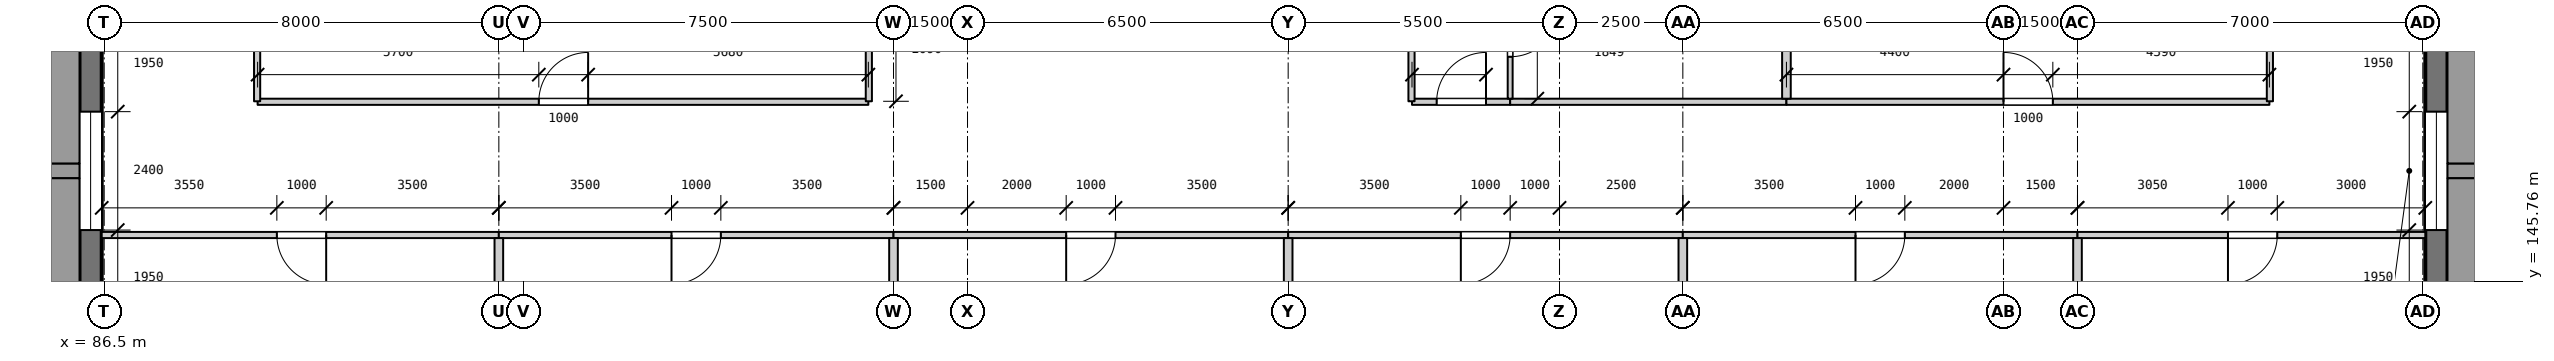
"""IFC4 building model, lengths in metres.
Left out: names, types, materials, properties, quantities, classifications, styles, units other than length and angle.
Written with IfcOpenShell. Run it as: python <this file> out.ifc"""

import sys

from ifc_helpers import new_model, si_unit, direction, frame, frame_2d, origin, place, context, subcontext, project, spatial, rectangle, extrude, element, fill, save


model = new_model("IFC4")
c1 = context("Model", 3, precision=1e-05, world=origin(), true_north=direction((0.0, 1.0)))
c2 = subcontext(c1, "Body", "Model", "MODEL_VIEW")
j1 = project(units=[si_unit("LENGTHUNIT", "METRE"), si_unit("PLANEANGLEUNIT", "RADIAN")], contexts=[c1])
p1 = place(None, origin())
s1 = spatial("IfcSite", under=j1, at=p1, CompositionType="ELEMENT")
p2 = place(p1, origin())
s2 = spatial("IfcBuilding", under=s1, at=p2, CompositionType="ELEMENT")
p3 = place(p2, frame((0.0, 0.0, 6.0)))
s3 = spatial("IfcBuildingStorey", under=s2, at=p3, CompositionType="ELEMENT", Elevation=6.0)
p4 = place(p3, frame((86.225, 144.85, 0.0), z_axis=(0.0, 0.0, 1.0), x_axis=(0.0, 1.0, 0.0)))
e1 = element("IfcWall", 1, at=p4, inside=s3, PredefinedType="SOLIDWALL", context=c2, shape_type="SweptSolid", body=[
    extrude(rectangle(XDim=6.3, YDim=0.45, at=frame_2d((3.15, 0.0))), origin(), (0.0, 0.0, 1.0), 3.2),
])
p5 = place(p4, frame((1.95, 0.0, 0.9)))
e2 = element("IfcOpeningElement", 2, at=p5, cuts=e1, PredefinedType="OPENING", context=c2, shape_type="SweptSolid", body=[
    extrude(rectangle(XDim=2.4, YDim=1.6, at=frame_2d((1.2, 0.8))), frame((0.0, 0.235, 0.0), z_axis=(0.0, -1.0, 0.0), x_axis=(1.0, 0.0, 0.0)), (0.0, 0.0, 1.0), 0.47),
])
p6 = place(p3, frame((133.775, 151.15, 0.0), z_axis=(0.0, 0.0, 1.0), x_axis=(0.0, -1.0, 0.0)))
e3 = element("IfcWall", 3, at=p6, inside=s3, PredefinedType="SOLIDWALL", context=c2, shape_type="SweptSolid", body=[
    extrude(rectangle(XDim=6.3, YDim=0.45, at=frame_2d((3.15, 0.0))), origin(), (0.0, 0.0, 1.0), 3.2),
])
p7 = place(p6, frame((1.95, 0.0, 0.9)))
e4 = element("IfcOpeningElement", 4, at=p7, cuts=e3, PredefinedType="OPENING", context=c2, shape_type="SweptSolid", body=[
    extrude(rectangle(XDim=2.4, YDim=1.6, at=frame_2d((1.2, 0.8))), frame((0.0, 0.235, 0.0), z_axis=(0.0, -1.0, 0.0), x_axis=(1.0, 0.0, 0.0)), (0.0, 0.0, 1.0), 0.47),
])
p8 = place(p3, frame((86.45, 146.7, 0.0), z_axis=(0.0, 0.0, 1.0), x_axis=(1.0, 0.0, 0.0)))
e5 = element("IfcWall", 5, at=p8, inside=s3, PredefinedType="PARTITIONING", context=c2, shape_type="SweptSolid", body=[
    extrude(rectangle(XDim=8.05, YDim=0.125, at=frame_2d((4.025, 0.0))), origin(), (0.0, 0.0, 1.0), 3.9),
])
p9 = place(p8, frame((3.55, 0.0, 0.0)))
e6 = element("IfcOpeningElement", 6, at=p9, cuts=e5, PredefinedType="OPENING", context=c2, shape_type="SweptSolid", body=[
    extrude(rectangle(XDim=1.0, YDim=2.1, at=frame_2d((0.5, 1.05))), frame((0.0, 0.073, 0.0), z_axis=(0.0, -1.0, 0.0), x_axis=(1.0, 0.0, 0.0)), (0.0, 0.0, 1.0), 0.145),
])
p10 = place(p3, frame((94.5, 146.7, 0.0), z_axis=(0.0, 0.0, 1.0), x_axis=(1.0, 0.0, 0.0)))
e7 = element("IfcWall", 7, at=p10, inside=s3, PredefinedType="PARTITIONING", context=c2, shape_type="SweptSolid", body=[
    extrude(rectangle(XDim=8.0, YDim=0.125, at=frame_2d((4.0, 0.0))), origin(), (0.0, 0.0, 1.0), 3.9),
])
p11 = place(p10, frame((3.5, 0.0, 0.0)))
e8 = element("IfcOpeningElement", 8, at=p11, cuts=e7, PredefinedType="OPENING", context=c2, shape_type="SweptSolid", body=[
    extrude(rectangle(XDim=1.0, YDim=2.1, at=frame_2d((0.5, 1.05))), frame((0.0, 0.073, 0.0), z_axis=(0.0, -1.0, 0.0), x_axis=(1.0, 0.0, 0.0)), (0.0, 0.0, 1.0), 0.145),
])
p12 = place(p3, frame((102.5, 146.7, 0.0), z_axis=(0.0, 0.0, 1.0), x_axis=(1.0, 0.0, 0.0)))
e9 = element("IfcWall", 9, at=p12, inside=s3, PredefinedType="PARTITIONING", context=c2, shape_type="SweptSolid", body=[
    extrude(rectangle(XDim=8.0, YDim=0.125, at=frame_2d((4.0, 0.0))), origin(), (0.0, 0.0, 1.0), 3.9),
])
p13 = place(p12, frame((3.5, 0.0, 0.0)))
e10 = element("IfcOpeningElement", 10, at=p13, cuts=e9, PredefinedType="OPENING", context=c2, shape_type="SweptSolid", body=[
    extrude(rectangle(XDim=1.0, YDim=2.1, at=frame_2d((0.5, 1.05))), frame((0.0, 0.073, 0.0), z_axis=(0.0, -1.0, 0.0), x_axis=(1.0, 0.0, 0.0)), (0.0, 0.0, 1.0), 0.145),
])
p14 = place(p3, frame((110.5, 146.7, 0.0), z_axis=(0.0, 0.0, 1.0), x_axis=(1.0, 0.0, 0.0)))
e11 = element("IfcWall", 11, at=p14, inside=s3, PredefinedType="PARTITIONING", context=c2, shape_type="SweptSolid", body=[
    extrude(rectangle(XDim=8.0, YDim=0.125, at=frame_2d((4.0, 0.0))), origin(), (0.0, 0.0, 1.0), 3.9),
])
p15 = place(p14, frame((3.5, 0.0, 0.0)))
e12 = element("IfcOpeningElement", 12, at=p15, cuts=e11, PredefinedType="OPENING", context=c2, shape_type="SweptSolid", body=[
    extrude(rectangle(XDim=1.0, YDim=2.1, at=frame_2d((0.5, 1.05))), frame((0.0, 0.073, 0.0), z_axis=(0.0, -1.0, 0.0), x_axis=(1.0, 0.0, 0.0)), (0.0, 0.0, 1.0), 0.145),
])
p16 = place(p3, frame((118.5, 146.7, 0.0), z_axis=(0.0, 0.0, 1.0), x_axis=(1.0, 0.0, 0.0)))
e13 = element("IfcWall", 13, at=p16, inside=s3, PredefinedType="PARTITIONING", context=c2, shape_type="SweptSolid", body=[
    extrude(rectangle(XDim=8.0, YDim=0.125, at=frame_2d((4.0, 0.0))), origin(), (0.0, 0.0, 1.0), 3.9),
])
p17 = place(p16, frame((3.5, 0.0, 0.0)))
e14 = element("IfcOpeningElement", 14, at=p17, cuts=e13, PredefinedType="OPENING", context=c2, shape_type="SweptSolid", body=[
    extrude(rectangle(XDim=1.0, YDim=2.1, at=frame_2d((0.5, 1.05))), frame((0.0, 0.073, 0.0), z_axis=(0.0, -1.0, 0.0), x_axis=(1.0, 0.0, 0.0)), (0.0, 0.0, 1.0), 0.145),
])
p18 = place(p3, frame((126.5, 146.7, 0.0), z_axis=(0.0, 0.0, 1.0), x_axis=(1.0, 0.0, 0.0)))
e15 = element("IfcWall", 15, at=p18, inside=s3, PredefinedType="PARTITIONING", context=c2, shape_type="SweptSolid", body=[
    extrude(rectangle(XDim=7.05, YDim=0.125, at=frame_2d((3.525, 0.0))), origin(), (0.0, 0.0, 1.0), 3.9),
])
p19 = place(p18, frame((3.05, 0.0, 0.0)))
e16 = element("IfcOpeningElement", 16, at=p19, cuts=e15, PredefinedType="OPENING", context=c2, shape_type="SweptSolid", body=[
    extrude(rectangle(XDim=1.0, YDim=2.1, at=frame_2d((0.5, 1.05))), frame((0.0, 0.073, 0.0), z_axis=(0.0, -1.0, 0.0), x_axis=(1.0, 0.0, 0.0)), (0.0, 0.0, 1.0), 0.145),
])
p20 = place(p3, frame((89.61, 149.4, 0.0), z_axis=(0.0, 0.0, 1.0), x_axis=(1.0, 0.0, 0.0)))
e17 = element("IfcWall", 17, at=p20, inside=s3, PredefinedType="PARTITIONING", context=c2, shape_type="SweptSolid", body=[
    extrude(rectangle(XDim=12.38, YDim=0.125, at=frame_2d((6.19, 0.0))), origin(), (0.0, 0.0, 1.0), 3.9),
])
p21 = place(p20, frame((5.7, 0.0, 0.0)))
e18 = element("IfcOpeningElement", 18, at=p21, cuts=e17, PredefinedType="OPENING", context=c2, shape_type="SweptSolid", body=[
    extrude(rectangle(XDim=1.0, YDim=2.1, at=frame_2d((0.5, 1.05))), frame((0.0, 0.073, 0.0), z_axis=(0.0, -1.0, 0.0), x_axis=(1.0, 0.0, 0.0)), (0.0, 0.0, 1.0), 0.145),
])
p22 = place(p3, frame((113.01, 149.4, 0.0), z_axis=(0.0, 0.0, 1.0), x_axis=(1.0, 0.0, 0.0)))
e19 = element("IfcWall", 19, at=p22, inside=s3, PredefinedType="PARTITIONING", context=c2, shape_type="SweptSolid", body=[
    extrude(rectangle(XDim=1.99, YDim=0.125, at=frame_2d((0.995, 0.0))), origin(), (0.0, 0.0, 1.0), 3.9),
])
p23 = place(p22, frame((0.5, 0.0, 0.0)))
e20 = element("IfcOpeningElement", 20, at=p23, cuts=e19, PredefinedType="OPENING", context=c2, shape_type="SweptSolid", body=[
    extrude(rectangle(XDim=1.0, YDim=2.1, at=frame_2d((0.5, 1.05))), frame((0.0, 0.073, 0.0), z_axis=(0.0, -1.0, 0.0), x_axis=(1.0, 0.0, 0.0)), (0.0, 0.0, 1.0), 0.145),
])
p24 = place(p3, frame((115.0, 149.4, 0.0), z_axis=(0.0, 0.0, 1.0), x_axis=(1.0, 0.0, 0.0)))
e21 = element("IfcWall", 21, at=p24, inside=s3, PredefinedType="PARTITIONING", context=c2, shape_type="SweptSolid", body=[
    extrude(rectangle(XDim=5.6, YDim=0.125, at=frame_2d((2.8, 0.0))), origin(), (0.0, 0.0, 1.0), 3.9),
])
p25 = place(p3, frame((120.6, 149.4, 0.0), z_axis=(0.0, 0.0, 1.0), x_axis=(1.0, 0.0, 0.0)))
e22 = element("IfcWall", 22, at=p25, inside=s3, PredefinedType="PARTITIONING", context=c2, shape_type="SweptSolid", body=[
    extrude(rectangle(XDim=9.79, YDim=0.125, at=frame_2d((4.895, 0.0))), origin(), (0.0, 0.0, 1.0), 3.9),
])
p26 = place(p25, frame((4.4, 0.0, 0.0)))
e23 = element("IfcOpeningElement", 23, at=p26, cuts=e22, PredefinedType="OPENING", context=c2, shape_type="SweptSolid", body=[
    extrude(rectangle(XDim=1.0, YDim=2.1, at=frame_2d((0.5, 1.05))), frame((0.0, 0.073, 0.0), z_axis=(0.0, -1.0, 0.0), x_axis=(1.0, 0.0, 0.0)), (0.0, 0.0, 1.0), 0.145),
])
p27 = place(p3, frame((89.6, 149.41, 0.0), z_axis=(0.0, 0.0, 1.0), x_axis=(0.0, 1.0, 0.0)))
e24 = element("IfcWall", 24, at=p27, inside=s3, PredefinedType="PARTITIONING", context=c2, shape_type="SweptSolid", body=[
    extrude(rectangle(XDim=8.29, YDim=0.125, at=frame_2d((4.145, 0.0))), origin(), (0.0, 0.0, 1.0), 3.9),
])
p28 = place(p3, frame((94.5, 144.85, 0.0), z_axis=(0.0, 0.0, 1.0), x_axis=(0.0, 1.0, 0.0)))
e25 = element("IfcWall", 25, at=p28, inside=s3, PredefinedType="PARTITIONING", context=c2, shape_type="SweptSolid", body=[
    extrude(rectangle(XDim=1.787, YDim=0.175, at=frame_2d((0.894, 0.0))), origin(), (0.0, 0.0, 1.0), 3.2),
])
p29 = place(p3, frame((102.0, 149.41, 0.0), z_axis=(0.0, 0.0, 1.0), x_axis=(0.0, 1.0, 0.0)))
e26 = element("IfcWall", 26, at=p29, inside=s3, PredefinedType="PARTITIONING", context=c2, shape_type="SweptSolid", body=[
    extrude(rectangle(XDim=8.29, YDim=0.125, at=frame_2d((4.145, 0.0))), origin(), (0.0, 0.0, 1.0), 3.9),
])
p30 = place(p29, frame((3.65, 0.0, 0.0)))
e27 = element("IfcOpeningElement", 27, at=p30, cuts=e26, PredefinedType="OPENING", context=c2, shape_type="SweptSolid", body=[
    extrude(rectangle(XDim=1.0, YDim=2.1, at=frame_2d((0.5, 1.05))), frame((0.0, 0.073, 0.0), z_axis=(0.0, -1.0, 0.0), x_axis=(1.0, 0.0, 0.0)), (0.0, 0.0, 1.0), 0.145),
])
for number, where, z_axis, x_axis in (
    (28, (102.5, 144.85, 0.0), (0.0, 0.0, 1.0), (0.0, 1.0, 0.0)),
    (29, (110.5, 144.85, 0.0), (0.0, 0.0, 1.0), (0.0, 1.0, 0.0)),
):
    element("IfcWall", number, at=place(p3, frame(where, z_axis=z_axis, x_axis=x_axis)), inside=s3, PredefinedType="PARTITIONING", context=c2, shape_type="SweptSolid", body=[
        extrude(rectangle(XDim=1.787, YDim=0.175, at=frame_2d((0.894, 0.0))), origin(), (0.0, 0.0, 1.0), 3.2),
    ])
p31 = place(p3, frame((113.0, 149.41, 0.0), z_axis=(0.0, 0.0, 1.0), x_axis=(0.0, 1.0, 0.0)))
e30 = element("IfcWall", 30, at=p31, inside=s3, PredefinedType="PARTITIONING", context=c2, shape_type="SweptSolid", body=[
    extrude(rectangle(XDim=8.29, YDim=0.125, at=frame_2d((4.145, 0.0))), origin(), (0.0, 0.0, 1.0), 3.9),
])
p32 = place(p3, frame((115.0, 149.462, 0.0), z_axis=(0.0, 0.0, 1.0), x_axis=(0.0, 1.0, 0.0)))
e31 = element("IfcWall", 31, at=p32, inside=s3, PredefinedType="PARTITIONING", context=c2, shape_type="SweptSolid", body=[
    extrude(rectangle(XDim=2.704, YDim=0.1, at=frame_2d((1.352, 0.0))), origin(), (0.0, 0.0, 1.0), 3.9),
])
p33 = place(p32, frame((0.85, 0.0, 0.0)))
e32 = element("IfcOpeningElement", 32, at=p33, cuts=e31, PredefinedType="OPENING", context=c2, shape_type="SweptSolid", body=[
    extrude(rectangle(XDim=1.0, YDim=2.1, at=frame_2d((0.5, 1.05))), frame((0.0, 0.06, 0.0), z_axis=(0.0, -1.0, 0.0), x_axis=(1.0, 0.0, 0.0)), (0.0, 0.0, 1.0), 0.12),
])
p34 = place(p3, frame((118.5, 144.85, 0.0), z_axis=(0.0, 0.0, 1.0), x_axis=(0.0, 1.0, 0.0)))
e33 = element("IfcWall", 33, at=p34, inside=s3, PredefinedType="PARTITIONING", context=c2, shape_type="SweptSolid", body=[
    extrude(rectangle(XDim=1.787, YDim=0.175, at=frame_2d((0.894, 0.0))), origin(), (0.0, 0.0, 1.0), 3.2),
])
p35 = place(p3, frame((120.6, 149.462, 0.0), z_axis=(0.0, 0.0, 1.0), x_axis=(0.0, 1.0, 0.0)))
e34 = element("IfcWall", 34, at=p35, inside=s3, PredefinedType="PARTITIONING", context=c2, shape_type="SweptSolid", body=[
    extrude(rectangle(XDim=2.704, YDim=0.175, at=frame_2d((1.352, 0.0))), origin(), (0.0, 0.0, 1.0), 3.9),
])
p36 = place(p3, frame((126.5, 144.85, 0.0), z_axis=(0.0, 0.0, 1.0), x_axis=(0.0, 1.0, 0.0)))
e35 = element("IfcWall", 35, at=p36, inside=s3, PredefinedType="PARTITIONING", context=c2, shape_type="SweptSolid", body=[
    extrude(rectangle(XDim=1.787, YDim=0.175, at=frame_2d((0.894, 0.0))), origin(), (0.0, 0.0, 1.0), 3.2),
])
p37 = place(p3, frame((130.4, 149.41, 0.0), z_axis=(0.0, 0.0, 1.0), x_axis=(0.0, 1.0, 0.0)))
e36 = element("IfcWall", 36, at=p37, inside=s3, PredefinedType="PARTITIONING", context=c2, shape_type="SweptSolid", body=[
    extrude(rectangle(XDim=8.29, YDim=0.125, at=frame_2d((4.145, 0.0))), origin(), (0.0, 0.0, 1.0), 3.9),
])
p38 = place(p5, origin())
e37 = element("IfcWindow", 37, at=p38, inside=s3, PartitioningType="SINGLE_PANEL", PredefinedType="WINDOW", context=c2, shape_type="SweptSolid", body=[
    extrude(rectangle(XDim=2.4, YDim=1.6, at=frame_2d((1.2, 0.8))), frame((0.0, -0.125, 0.0), z_axis=(0.0, -1.0, 0.0), x_axis=(1.0, 0.0, 0.0)), (0.0, 0.0, 1.0), 0.06),
])
fill(e2, e37)
p39 = place(p7, origin())
e38 = element("IfcWindow", 38, at=p39, inside=s3, PartitioningType="SINGLE_PANEL", PredefinedType="WINDOW", context=c2, shape_type="SweptSolid", body=[
    extrude(rectangle(XDim=2.4, YDim=1.6, at=frame_2d((1.2, 0.8))), frame((0.0, -0.125, 0.0), z_axis=(0.0, -1.0, 0.0), x_axis=(1.0, 0.0, 0.0)), (0.0, 0.0, 1.0), 0.06),
])
fill(e4, e38)
p40 = place(p9, frame((1.0, 0.0, 0.0), z_axis=(0.0, 0.0, 1.0), x_axis=(-1.0, 0.0, 0.0)))
e39 = element("IfcDoor", 39, at=p40, inside=s3, OperationType="SINGLE_SWING_LEFT", PredefinedType="DOOR", context=c2, shape_type="SweptSolid", body=[
    extrude(rectangle(XDim=1.0, YDim=2.1, at=frame_2d((0.5, 1.05))), frame((0.0, 0.025, 0.0), z_axis=(0.0, -1.0, 0.0), x_axis=(1.0, 0.0, 0.0)), (0.0, 0.0, 1.0), 0.05),
])
fill(e6, e39)
p41 = place(p11, frame((1.0, 0.0, 0.0), z_axis=(0.0, 0.0, 1.0), x_axis=(-1.0, 0.0, 0.0)))
e40 = element("IfcDoor", 40, at=p41, inside=s3, OperationType="SINGLE_SWING_RIGHT", PredefinedType="DOOR", context=c2, shape_type="SweptSolid", body=[
    extrude(rectangle(XDim=1.0, YDim=2.1, at=frame_2d((0.5, 1.05))), frame((0.0, 0.025, 0.0), z_axis=(0.0, -1.0, 0.0), x_axis=(1.0, 0.0, 0.0)), (0.0, 0.0, 1.0), 0.05),
])
fill(e8, e40)
p42 = place(p13, frame((1.0, 0.0, 0.0), z_axis=(0.0, 0.0, 1.0), x_axis=(-1.0, 0.0, 0.0)))
e41 = element("IfcDoor", 41, at=p42, inside=s3, OperationType="SINGLE_SWING_RIGHT", PredefinedType="DOOR", context=c2, shape_type="SweptSolid", body=[
    extrude(rectangle(XDim=1.0, YDim=2.1, at=frame_2d((0.5, 1.05))), frame((0.0, 0.025, 0.0), z_axis=(0.0, -1.0, 0.0), x_axis=(1.0, 0.0, 0.0)), (0.0, 0.0, 1.0), 0.05),
])
fill(e10, e41)
p43 = place(p15, frame((1.0, 0.0, 0.0), z_axis=(0.0, 0.0, 1.0), x_axis=(-1.0, 0.0, 0.0)))
e42 = element("IfcDoor", 42, at=p43, inside=s3, OperationType="SINGLE_SWING_RIGHT", PredefinedType="DOOR", context=c2, shape_type="SweptSolid", body=[
    extrude(rectangle(XDim=1.0, YDim=2.1, at=frame_2d((0.5, 1.05))), frame((0.0, 0.025, 0.0), z_axis=(0.0, -1.0, 0.0), x_axis=(1.0, 0.0, 0.0)), (0.0, 0.0, 1.0), 0.05),
])
fill(e12, e42)
p44 = place(p17, frame((1.0, 0.0, 0.0), z_axis=(0.0, 0.0, 1.0), x_axis=(-1.0, 0.0, 0.0)))
e43 = element("IfcDoor", 43, at=p44, inside=s3, OperationType="SINGLE_SWING_RIGHT", PredefinedType="DOOR", context=c2, shape_type="SweptSolid", body=[
    extrude(rectangle(XDim=1.0, YDim=2.1, at=frame_2d((0.5, 1.05))), frame((0.0, 0.025, 0.0), z_axis=(0.0, -1.0, 0.0), x_axis=(1.0, 0.0, 0.0)), (0.0, 0.0, 1.0), 0.05),
])
fill(e14, e43)
p45 = place(p19, frame((1.0, 0.0, 0.0), z_axis=(0.0, 0.0, 1.0), x_axis=(-1.0, 0.0, 0.0)))
e44 = element("IfcDoor", 44, at=p45, inside=s3, OperationType="SINGLE_SWING_RIGHT", PredefinedType="DOOR", context=c2, shape_type="SweptSolid", body=[
    extrude(rectangle(XDim=1.0, YDim=2.1, at=frame_2d((0.5, 1.05))), frame((0.0, 0.025, 0.0), z_axis=(0.0, -1.0, 0.0), x_axis=(1.0, 0.0, 0.0)), (0.0, 0.0, 1.0), 0.05),
])
fill(e16, e44)
p46 = place(p21, origin())
e45 = element("IfcDoor", 45, at=p46, inside=s3, OperationType="SINGLE_SWING_RIGHT", PredefinedType="DOOR", context=c2, shape_type="SweptSolid", body=[
    extrude(rectangle(XDim=1.0, YDim=2.1, at=frame_2d((0.5, 1.05))), frame((0.0, 0.025, 0.0), z_axis=(0.0, -1.0, 0.0), x_axis=(1.0, 0.0, 0.0)), (0.0, 0.0, 1.0), 0.05),
])
fill(e18, e45)
p47 = place(p23, origin())
e46 = element("IfcDoor", 46, at=p47, inside=s3, OperationType="SINGLE_SWING_RIGHT", PredefinedType="DOOR", context=c2, shape_type="SweptSolid", body=[
    extrude(rectangle(XDim=1.0, YDim=2.1, at=frame_2d((0.5, 1.05))), frame((0.0, 0.025, 0.0), z_axis=(0.0, -1.0, 0.0), x_axis=(1.0, 0.0, 0.0)), (0.0, 0.0, 1.0), 0.05),
])
fill(e20, e46)
p48 = place(p26, origin())
e47 = element("IfcDoor", 47, at=p48, inside=s3, OperationType="SINGLE_SWING_LEFT", PredefinedType="DOOR", context=c2, shape_type="SweptSolid", body=[
    extrude(rectangle(XDim=1.0, YDim=2.1, at=frame_2d((0.5, 1.05))), frame((0.0, 0.025, 0.0), z_axis=(0.0, -1.0, 0.0), x_axis=(1.0, 0.0, 0.0)), (0.0, 0.0, 1.0), 0.05),
])
fill(e23, e47)
p49 = place(p33, frame((1.0, 0.0, 0.0), z_axis=(0.0, 0.0, 1.0), x_axis=(-1.0, 0.0, 0.0)))
e48 = element("IfcDoor", 48, at=p49, inside=s3, OperationType="SINGLE_SWING_LEFT", PredefinedType="DOOR", context=c2, shape_type="SweptSolid", body=[
    extrude(rectangle(XDim=1.0, YDim=2.1, at=frame_2d((0.5, 1.05))), frame((0.0, 0.025, 0.0), z_axis=(0.0, -1.0, 0.0), x_axis=(1.0, 0.0, 0.0)), (0.0, 0.0, 1.0), 0.05),
])
fill(e32, e48)
save(model, sys.argv[1])
